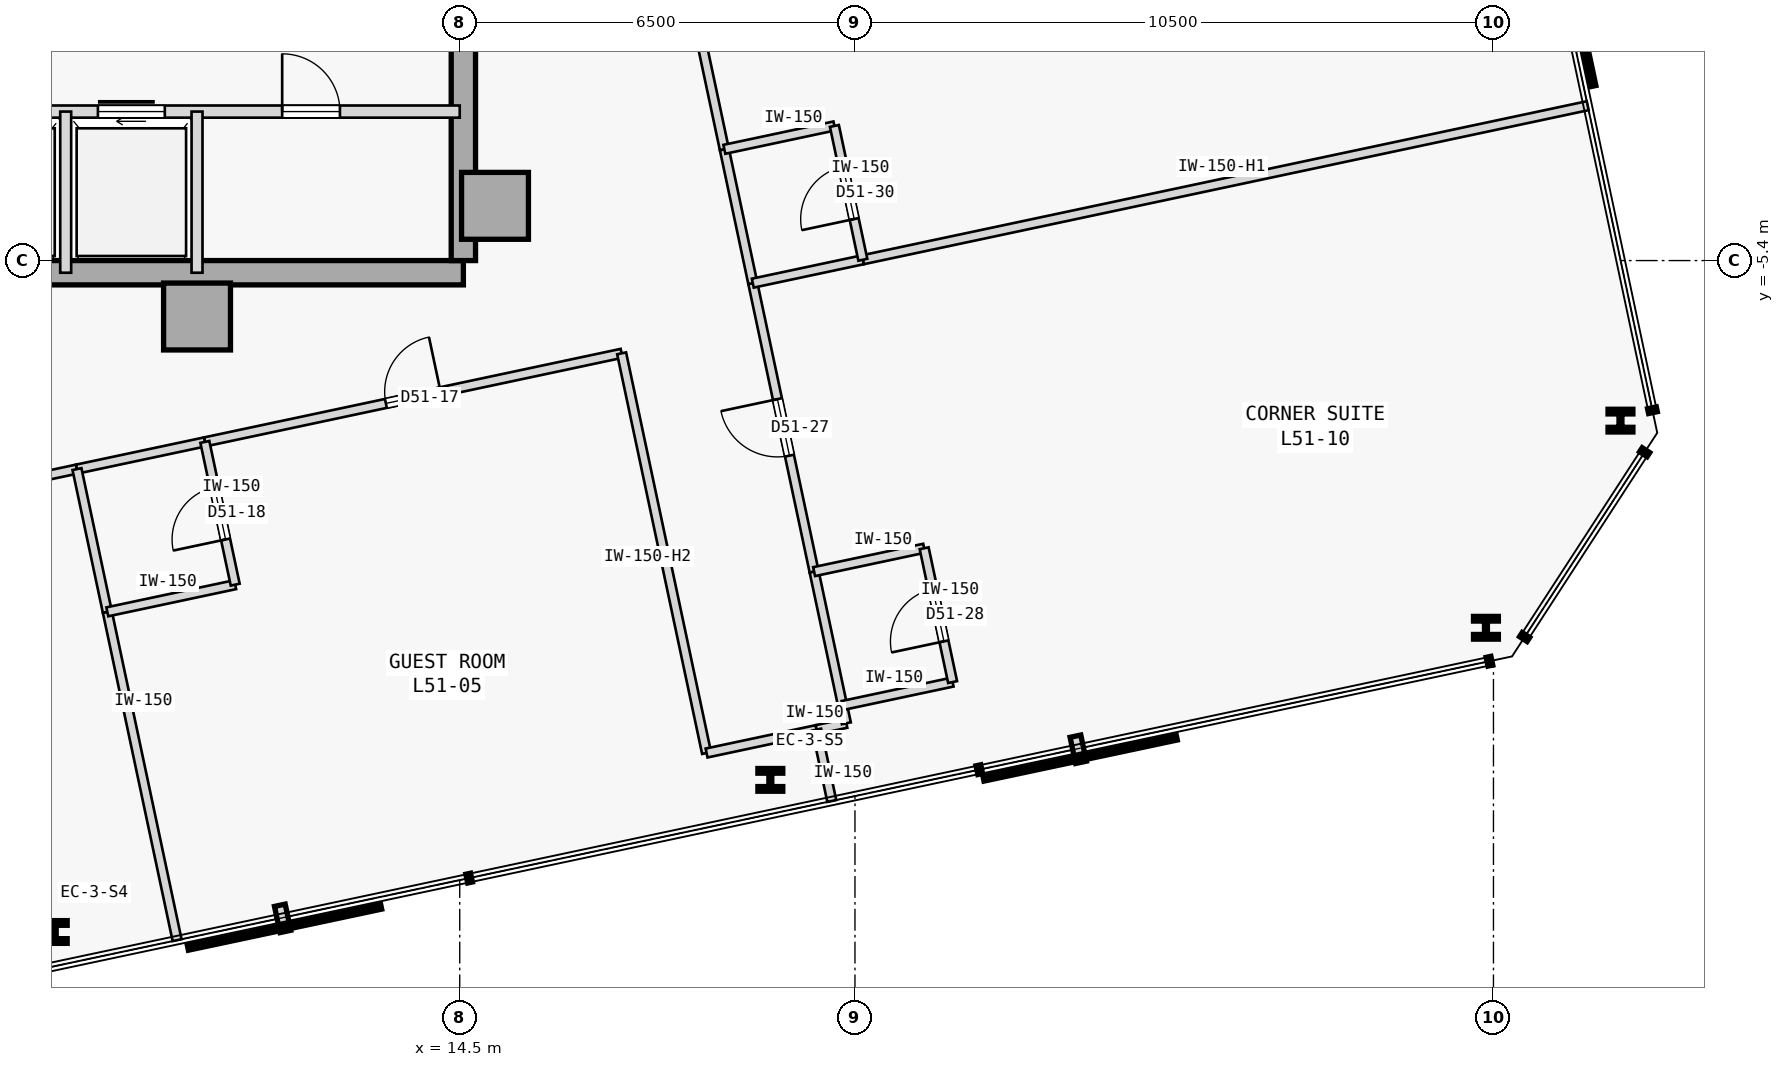
"""IFC4 building model, lengths in metres.
Left out: names, types, materials, properties, quantities, classifications, styles, units other than length and angle.
Written with IfcOpenShell. Run it as: python <this file> out.ifc"""

import sys

from ifc_helpers import new_model, si_unit, direction, frame, frame_2d, origin, origin_2d, place, context, subcontext, project, spatial, rectangle, i_section, extrude, element, fill, save


model = new_model("IFC4")
c1 = context("Model", 3, precision=1e-05, world=origin(), true_north=direction((0.0, 1.0)))
c2 = subcontext(c1, "Body", "Model", "MODEL_VIEW")
j1 = project(units=[si_unit("LENGTHUNIT", "METRE"), si_unit("PLANEANGLEUNIT", "RADIAN")], contexts=[c1])
p1 = place(None, origin())
s1 = spatial("IfcSite", under=j1, at=p1, CompositionType="ELEMENT")
p2 = place(p1, origin())
s2 = spatial("IfcBuilding", under=s1, at=p2, CompositionType="ELEMENT")
p3 = place(p2, frame((0.0, 0.0, 195.6)))
s3 = spatial("IfcBuildingStorey", under=s2, at=p3, CompositionType="ELEMENT", Elevation=195.6)
for number, where, z_axis, x_axis in (
    (1, (15.08, -4.5, 0.0), (0.0, 0.0, 1.0), (1.0, 0.0, 0.0)),
    (2, (10.18, -6.32, 0.0), (0.0, 0.0, 1.0), (1.0, 0.0, 0.0)),
):
    element("IfcColumn", number, at=place(p3, frame(where, z_axis=z_axis, x_axis=x_axis)), inside=s3, PredefinedType="COLUMN", context=c2, shape_type="SweptSolid", body=[
        extrude(rectangle(XDim=1.1, YDim=1.1, at=origin_2d()), origin(), (0.0, 0.0, 1.0), 3.4),
    ])
p4 = place(p3, frame((3.7, -5.6, 0.0), z_axis=(0.0, 0.0, 1.0), x_axis=(1.0, 0.0, 0.0)))
e3 = element("IfcWall", 3, at=p4, inside=s3, PredefinedType="SHEAR", context=c2, shape_type="SweptSolid", body=[
    extrude(rectangle(XDim=10.86, YDim=0.4, at=frame_2d((5.43, 0.0))), origin(), (0.0, 0.0, 1.0), 3.175),
])
p5 = place(p3, frame((14.56, -5.4, 0.0), z_axis=(0.0, 0.0, 1.0), x_axis=(0.0, 1.0, 0.0)))
e4 = element("IfcWall", 4, at=p5, inside=s3, PredefinedType="SHEAR", context=c2, shape_type="SweptSolid", body=[
    extrude(rectangle(XDim=10.8, YDim=0.4, at=frame_2d((5.4, 0.0))), origin(), (0.0, 0.0, 1.0), 3.175),
])
for number, where, z_axis, x_axis in (
    (5, (7.84, -16.441, 0.0), (0.0, 0.0, 1.0), (1.0, 0.0, 0.0)),
    (6, (19.608, -13.94, 0.0), (0.0, 0.0, 1.0), (1.0, 0.0, 0.0)),
    (7, (31.376, -11.439, 0.0), (0.0, 0.0, 1.0), (1.0, 0.0, 0.0)),
    (8, (33.589, -8.032, 0.0), (0.0, 0.0, 1.0), (1.0, 0.0, 0.0)),
):
    element("IfcColumn", number, at=place(p3, frame(where, z_axis=z_axis, x_axis=x_axis)), inside=s3, PredefinedType="COLUMN", context=c2, shape_type="SweptSolid", body=[
        extrude(i_section(OverallWidth=0.409, OverallDepth=0.374, WebThickness=0.048, FlangeThickness=0.077, FilletRadius=0.015, at=origin_2d()), origin(), (0.0, 0.0, 1.0), 3.4),
    ])
p6 = place(p3, frame((3.7, -2.95, 0.0), z_axis=(0.0, 0.0, 1.0), x_axis=(1.0, 0.0, 0.0)))
e9 = element("IfcWall", 9, at=p6, inside=s3, PredefinedType="STANDARD", context=c2, shape_type="SweptSolid", body=[
    extrude(rectangle(XDim=10.8, YDim=0.2, at=frame_2d((5.4, 0.0))), origin(), (0.0, 0.0, 1.0), 3.175),
])
p7 = place(p6, frame((2.69, 0.0, 0.0)))
e10 = element("IfcOpeningElement", 10, at=p7, cuts=e9, PredefinedType="OPENING", context=c2, shape_type="SweptSolid", body=[
    extrude(rectangle(XDim=1.1, YDim=2.15, at=frame_2d((0.55, 1.075))), frame((0.0, 0.11, 0.0), z_axis=(0.0, -1.0, 0.0), x_axis=(1.0, 0.0, 0.0)), (0.0, 0.0, 1.0), 0.22),
])
p8 = place(p6, frame((4.85, 0.0, 0.0)))
e11 = element("IfcOpeningElement", 11, at=p8, cuts=e9, PredefinedType="OPENING", context=c2, shape_type="SweptSolid", body=[
    extrude(rectangle(XDim=1.1, YDim=2.15, at=frame_2d((0.55, 1.075))), frame((0.0, 0.11, 0.0), z_axis=(0.0, -1.0, 0.0), x_axis=(1.0, 0.0, 0.0)), (0.0, 0.0, 1.0), 0.22),
])
p9 = place(p6, frame((7.88, 0.0, 0.0)))
e12 = element("IfcOpeningElement", 12, at=p9, cuts=e9, PredefinedType="OPENING", context=c2, shape_type="SweptSolid", body=[
    extrude(rectangle(XDim=0.95, YDim=2.15, at=frame_2d((0.475, 1.075))), frame((0.0, 0.11, 0.0), z_axis=(0.0, -1.0, 0.0), x_axis=(1.0, 0.0, 0.0)), (0.0, 0.0, 1.0), 0.22),
])
for number, where, z_axis, x_axis in (
    (13, (10.18, -5.6, 0.0), (0.0, 0.0, 1.0), (0.0, 1.0, 0.0)),
    (14, (8.02, -5.6, 0.0), (0.0, 0.0, 1.0), (0.0, 1.0, 0.0)),
):
    element("IfcWall", number, at=place(p3, frame(where, z_axis=z_axis, x_axis=x_axis)), inside=s3, PredefinedType="STANDARD", context=c2, shape_type="SweptSolid", body=[
        extrude(rectangle(XDim=2.65, YDim=0.18, at=frame_2d((1.325, 0.0))), origin(), (0.0, 0.0, 1.0), 3.175),
    ])
p10 = place(p3, frame((-1.803, -10.957, 0.0), z_axis=(0.0, 0.0, 1.0), x_axis=(0.978145386425, 0.207922108048, 0.0)))
e15 = element("IfcWall", 15, at=p10, inside=s3, PredefinedType="PARTITIONING", context=c2, shape_type="SweptSolid", body=[
    extrude(rectangle(XDim=10.232, YDim=0.15, at=frame_2d((5.116, 0.0))), origin(), (0.0, 0.0, 1.0), 3.175),
])
p11 = place(p10, frame((4.656, 0.0, 0.0)))
e16 = element("IfcOpeningElement", 16, at=p11, cuts=e15, PredefinedType="OPENING", context=c2, shape_type="SweptSolid", body=[
    extrude(rectangle(XDim=0.92, YDim=2.15, at=frame_2d((0.46, 1.075))), frame((0.0, 0.085, 0.0), z_axis=(0.0, -1.0, 0.0), x_axis=(1.0, 0.0, 0.0)), (0.0, 0.0, 1.0), 0.17),
])
p12 = place(p3, frame((10.309, -8.382, 0.0), z_axis=(0.0, 0.0, 1.0), x_axis=(0.978149817889, 0.207901259648, 0.0)))
e17 = element("IfcWall", 17, at=p12, inside=s3, PredefinedType="PARTITIONING", context=c2, shape_type="SweptSolid", body=[
    extrude(rectangle(XDim=7.007, YDim=0.15, at=frame_2d((3.503, 0.0))), origin(), (0.0, 0.0, 1.0), 3.175),
])
p13 = place(p12, frame((3.043, 0.0, 0.0)))
e18 = element("IfcOpeningElement", 18, at=p13, cuts=e17, PredefinedType="OPENING", context=c2, shape_type="SweptSolid", body=[
    extrude(rectangle(XDim=0.92, YDim=2.15, at=frame_2d((0.46, 1.075))), frame((0.0, 0.085, 0.0), z_axis=(0.0, -1.0, 0.0), x_axis=(1.0, 0.0, 0.0)), (0.0, 0.0, 1.0), 0.17),
])
p14 = place(p3, frame((18.56, -13.498, 0.0), z_axis=(0.0, 0.0, 1.0), x_axis=(-0.207888737749, 0.978152479278, 0.0)))
e19 = element("IfcWall", 19, at=p14, inside=s3, PredefinedType="PARTITIONING", context=c2, shape_type="SweptSolid", body=[
    extrude(rectangle(XDim=6.72, YDim=0.15, at=frame_2d((3.36, 0.0))), origin(), (0.0, 0.0, 1.0), 2.575),
])
p15 = place(p3, frame((18.56, -13.498, 0.0), z_axis=(0.0, 0.0, 1.0), x_axis=(0.978160192495, 0.207852442415, 0.0)))
e20 = element("IfcWall", 20, at=p15, inside=s3, PredefinedType="PARTITIONING", context=c2, shape_type="SweptSolid", body=[
    extrude(rectangle(XDim=1.85, YDim=0.15, at=frame_2d((0.925, 0.0))), origin(), (0.0, 0.0, 1.0), 3.175),
])
p16 = place(p3, frame((8.206, -8.829, 0.0), z_axis=(0.0, 0.0, 1.0), x_axis=(0.978146728319, 0.207915795165, 0.0)))
e21 = element("IfcWall", 21, at=p16, inside=s3, PredefinedType="PARTITIONING", context=c2, shape_type="SweptSolid", body=[
    extrude(rectangle(XDim=2.15, YDim=0.15, at=frame_2d((1.075, 0.0))), origin(), (0.0, 0.0, 1.0), 3.175),
])
p17 = place(p3, frame((20.369, -13.114, 0.0), z_axis=(0.0, 0.0, 1.0), x_axis=(0.978143962546, 0.207928806409, 0.0)))
e22 = element("IfcWall", 22, at=p17, inside=s3, PredefinedType="PARTITIONING", context=c2, shape_type="SweptSolid", body=[
    extrude(rectangle(XDim=0.5, YDim=0.15, at=frame_2d((0.25, 0.0))), origin(), (0.0, 0.0, 1.0), 3.175),
])
p18 = place(p3, frame((20.858, -13.01, 0.0), z_axis=(0.0, 0.0, 1.0), x_axis=(-0.208306395052, 0.978063620518, 0.0)))
e23 = element("IfcWall", 23, at=p18, inside=s3, PredefinedType="PARTITIONING", context=c2, shape_type="SweptSolid", body=[
    extrude(rectangle(XDim=0.3, YDim=0.15, at=frame_2d((0.15, 0.0))), origin(), (0.0, 0.0, 1.0), 3.175),
])
p19 = place(p3, frame((20.328, -10.515, 0.0), z_axis=(0.0, 0.0, 1.0), x_axis=(-0.207950868925, 0.97813927235, 0.0)))
e24 = element("IfcWall", 24, at=p19, inside=s3, PredefinedType="PARTITIONING", context=c2, shape_type="SweptSolid", body=[
    extrude(rectangle(XDim=4.85, YDim=0.15, at=frame_2d((2.425, 0.0))), origin(), (0.0, 0.0, 1.0), 3.175),
])
p20 = place(p19, frame((1.95, 0.0, 0.0)))
e25 = element("IfcOpeningElement", 25, at=p20, cuts=e24, PredefinedType="OPENING", context=c2, shape_type="SweptSolid", body=[
    extrude(rectangle(XDim=0.95, YDim=2.15, at=frame_2d((0.475, 1.075))), frame((0.0, 0.085, 0.0), z_axis=(0.0, -1.0, 0.0), x_axis=(1.0, 0.0, 0.0)), (0.0, 0.0, 1.0), 0.17),
])
p21 = place(p3, frame((20.796, -12.716, 0.0), z_axis=(0.0, 0.0, 1.0), x_axis=(-0.207891197838, 0.978151956427, 0.0)))
e26 = element("IfcWall", 26, at=p21, inside=s3, PredefinedType="PARTITIONING", context=c2, shape_type="SweptSolid", body=[
    extrude(rectangle(XDim=2.25, YDim=0.15, at=frame_2d((1.125, 0.0))), origin(), (0.0, 0.0, 1.0), 3.175),
])
p22 = place(p3, frame((18.852, -3.571, 0.0), z_axis=(0.0, 0.0, 1.0), x_axis=(-0.207879907349, 0.978154355979, 0.0)))
e27 = element("IfcWall", 27, at=p22, inside=s3, PredefinedType="PARTITIONING", context=c2, shape_type="SweptSolid", body=[
    extrude(rectangle(XDim=6.35, YDim=0.15, at=frame_2d((3.175, 0.0))), origin(), (0.0, 0.0, 1.0), 3.175),
])
p23 = place(p22, frame((2.7, 0.0, 0.0)))
e28 = element("IfcOpeningElement", 28, at=p23, cuts=e27, PredefinedType="OPENING", context=c2, shape_type="SweptSolid", body=[
    extrude(rectangle(XDim=0.95, YDim=2.15, at=frame_2d((0.475, 1.075))), frame((0.0, 0.085, 0.0), z_axis=(0.0, -1.0, 0.0), x_axis=(1.0, 0.0, 0.0)), (0.0, 0.0, 1.0), 0.17),
])
p24 = place(p3, frame((19.32, -5.771, 0.0), z_axis=(0.0, 0.0, 1.0), x_axis=(-0.207913264065, 0.978147266328, 0.0)))
e29 = element("IfcWall", 29, at=p24, inside=s3, PredefinedType="PARTITIONING", context=c2, shape_type="SweptSolid", body=[
    extrude(rectangle(XDim=2.25, YDim=0.15, at=frame_2d((1.125, 0.0))), origin(), (0.0, 0.0, 1.0), 3.175),
])
p25 = place(p3, frame((9.852, -16.576, 0.0), z_axis=(0.0, 0.0, 1.0), x_axis=(-0.20792487872, 0.978144797466, 0.0)))
e30 = element("IfcWall", 30, at=p25, inside=s3, PredefinedType="PARTITIONING", context=c2, shape_type="SweptSolid", body=[
    extrude(rectangle(XDim=5.52, YDim=0.15, at=frame_2d((2.76, 0.0))), origin(), (0.0, 0.0, 1.0), 3.175),
])
p26 = place(p3, frame((8.705, -11.177, 0.0), z_axis=(0.0, 0.0, 1.0), x_axis=(-0.207917150959, 0.978146440129, 0.0)))
e31 = element("IfcWall", 31, at=p26, inside=s3, PredefinedType="PARTITIONING", context=c2, shape_type="SweptSolid", body=[
    extrude(rectangle(XDim=2.4, YDim=0.15, at=frame_2d((1.2, 0.0))), origin(), (0.0, 0.0, 1.0), 3.175),
])
p27 = place(p3, frame((8.705, -11.177, 0.0), z_axis=(0.0, 0.0, 1.0), x_axis=(0.978123629285, 0.208024435669, 0.0)))
e32 = element("IfcWall", 32, at=p27, inside=s3, PredefinedType="PARTITIONING", context=c2, shape_type="SweptSolid", body=[
    extrude(rectangle(XDim=2.15, YDim=0.15, at=frame_2d((1.075, 0.0))), origin(), (0.0, 0.0, 1.0), 3.175),
])
p28 = place(p3, frame((10.808, -10.729, 0.0), z_axis=(0.0, 0.0, 1.0), x_axis=(-0.207937840262, 0.978142042133, 0.0)))
e33 = element("IfcWall", 33, at=p28, inside=s3, PredefinedType="PARTITIONING", context=c2, shape_type="SweptSolid", body=[
    extrude(rectangle(XDim=2.4, YDim=0.15, at=frame_2d((1.2, 0.0))), origin(), (0.0, 0.0, 1.0), 3.175),
])
p29 = place(p28, frame((0.76, 0.0, 0.0)))
e34 = element("IfcOpeningElement", 34, at=p29, cuts=e33, PredefinedType="OPENING", context=c2, shape_type="SweptSolid", body=[
    extrude(rectangle(XDim=0.88, YDim=2.15, at=frame_2d((0.44, 1.075))), frame((0.0, 0.085, 0.0), z_axis=(0.0, -1.0, 0.0), x_axis=(1.0, 0.0, 0.0)), (0.0, 0.0, 1.0), 0.17),
])
p30 = place(p3, frame((20.619, -14.288, 0.0), z_axis=(0.0, 0.0, 1.0), x_axis=(-0.207917150959, 0.978146440129, 0.0)))
e35 = element("IfcWall", 35, at=p30, inside=s3, PredefinedType="PARTITIONING", context=c2, shape_type="SweptSolid", body=[
    extrude(rectangle(XDim=1.2, YDim=0.15, at=frame_2d((0.6, 0.0))), origin(), (0.0, 0.0, 1.0), 3.175),
])
for number, where, z_axis, x_axis in (
    (36, (20.796, -12.716, 0.0), (0.0, 0.0, 1.0), (0.978, 0.208, 0.0)),
    (37, (20.328, -10.515, 0.0), (0.0, 0.0, 1.0), (0.978, 0.208, 0.0)),
):
    element("IfcWall", number, at=place(p3, frame(where, z_axis=z_axis, x_axis=x_axis)), inside=s3, PredefinedType="PARTITIONING", context=c2, shape_type="SweptSolid", body=[
        extrude(rectangle(XDim=1.85, YDim=0.15, at=frame_2d((0.925, 0.0))), origin(), (0.0, 0.0, 1.0), 3.175),
    ])
p31 = place(p3, frame((22.605, -12.332, 0.0), z_axis=(0.0, 0.0, 1.0), x_axis=(-0.207891197838, 0.978151956427, 0.0)))
e38 = element("IfcWall", 38, at=p31, inside=s3, PredefinedType="PARTITIONING", context=c2, shape_type="SweptSolid", body=[
    extrude(rectangle(XDim=2.25, YDim=0.15, at=frame_2d((1.125, 0.0))), origin(), (0.0, 0.0, 1.0), 3.175),
])
p32 = place(p31, frame((0.685, 0.0, 0.0)))
e39 = element("IfcOpeningElement", 39, at=p32, cuts=e38, PredefinedType="OPENING", context=c2, shape_type="SweptSolid", body=[
    extrude(rectangle(XDim=0.88, YDim=2.15, at=frame_2d((0.44, 1.075))), frame((0.0, 0.085, 0.0), z_axis=(0.0, -1.0, 0.0), x_axis=(1.0, 0.0, 0.0)), (0.0, 0.0, 1.0), 0.17),
])
p33 = place(p3, frame((21.129, -5.387, 0.0), z_axis=(0.0, 0.0, 1.0), x_axis=(0.97814556055, 0.207921288896, 0.0)))
e40 = element("IfcWall", 40, at=p33, inside=s3, PredefinedType="PARTITIONING", context=c2, shape_type="SweptSolid", body=[
    extrude(rectangle(XDim=12.187, YDim=0.15, at=frame_2d((6.094, 0.0))), origin(), (0.0, 0.0, 1.0), 2.725),
])
p34 = place(p3, frame((19.32, -5.771, 0.0), z_axis=(0.0, 0.0, 1.0), x_axis=(0.978165892835, 0.207825614625, 0.0)))
e41 = element("IfcWall", 41, at=p34, inside=s3, PredefinedType="PARTITIONING", context=c2, shape_type="SweptSolid", body=[
    extrude(rectangle(XDim=1.85, YDim=0.15, at=frame_2d((0.925, 0.0))), origin(), (0.0, 0.0, 1.0), 3.175),
])
p35 = place(p3, frame((18.852, -3.571, 0.0), z_axis=(0.0, 0.0, 1.0), x_axis=(0.978139061018, 0.207951862966, 0.0)))
e42 = element("IfcWall", 42, at=p35, inside=s3, PredefinedType="PARTITIONING", context=c2, shape_type="SweptSolid", body=[
    extrude(rectangle(XDim=1.85, YDim=0.15, at=frame_2d((0.925, 0.0))), origin(), (0.0, 0.0, 1.0), 3.175),
])
p36 = place(p3, frame((21.129, -5.387, 0.0), z_axis=(0.0, 0.0, 1.0), x_axis=(-0.207891197838, 0.978151956427, 0.0)))
e43 = element("IfcWall", 43, at=p36, inside=s3, PredefinedType="PARTITIONING", context=c2, shape_type="SweptSolid", body=[
    extrude(rectangle(XDim=2.25, YDim=0.15, at=frame_2d((1.125, 0.0))), origin(), (0.0, 0.0, 1.0), 3.175),
])
p37 = place(p36, frame((0.685, 0.0, 0.0)))
e44 = element("IfcOpeningElement", 44, at=p37, cuts=e43, PredefinedType="OPENING", context=c2, shape_type="SweptSolid", body=[
    extrude(rectangle(XDim=0.88, YDim=2.15, at=frame_2d((0.44, 1.075))), frame((0.0, 0.085, 0.0), z_axis=(0.0, -1.0, 0.0), x_axis=(1.0, 0.0, 0.0)), (0.0, 0.0, 1.0), 0.17),
])
p38 = place(p8, origin())
e45 = element("IfcDoor", 45, at=p38, inside=s3, OperationType="SLIDING_TO_RIGHT", PredefinedType="DOOR", context=c2, shape_type="SweptSolid", body=[
    extrude(rectangle(XDim=1.1, YDim=2.15, at=frame_2d((0.55, 1.075))), frame((0.0, 0.025, 0.0), z_axis=(0.0, -1.0, 0.0), x_axis=(1.0, 0.0, 0.0)), (0.0, 0.0, 1.0), 0.05),
])
fill(e11, e45)
p39 = place(p9, origin())
e46 = element("IfcDoor", 46, at=p39, inside=s3, OperationType="SINGLE_SWING_LEFT", PredefinedType="DOOR", context=c2, shape_type="SweptSolid", body=[
    extrude(rectangle(XDim=0.95, YDim=2.15, at=frame_2d((0.475, 1.075))), frame((0.0, 0.025, 0.0), z_axis=(0.0, -1.0, 0.0), x_axis=(1.0, 0.0, 0.0)), (0.0, 0.0, 1.0), 0.05),
])
fill(e12, e46)
p40 = place(p13, origin())
e47 = element("IfcDoor", 47, at=p40, inside=s3, OperationType="SINGLE_SWING_RIGHT", PredefinedType="DOOR", context=c2, shape_type="SweptSolid", body=[
    extrude(rectangle(XDim=0.92, YDim=2.15, at=frame_2d((0.46, 1.075))), frame((0.0, 0.025, 0.0), z_axis=(0.0, -1.0, 0.0), x_axis=(1.0, 0.0, 0.0)), (0.0, 0.0, 1.0), 0.05),
])
fill(e18, e47)
p41 = place(p29, origin())
e48 = element("IfcDoor", 48, at=p41, inside=s3, OperationType="SINGLE_SWING_LEFT", PredefinedType="DOOR", context=c2, shape_type="SweptSolid", body=[
    extrude(rectangle(XDim=0.88, YDim=2.15, at=frame_2d((0.44, 1.075))), frame((0.0, 0.025, 0.0), z_axis=(0.0, -1.0, 0.0), x_axis=(1.0, 0.0, 0.0)), (0.0, 0.0, 1.0), 0.05),
])
fill(e34, e48)
p42 = place(p20, origin())
e49 = element("IfcDoor", 49, at=p42, inside=s3, OperationType="SINGLE_SWING_RIGHT", PredefinedType="DOOR", context=c2, shape_type="SweptSolid", body=[
    extrude(rectangle(XDim=0.95, YDim=2.15, at=frame_2d((0.475, 1.075))), frame((0.0, 0.025, 0.0), z_axis=(0.0, -1.0, 0.0), x_axis=(1.0, 0.0, 0.0)), (0.0, 0.0, 1.0), 0.05),
])
fill(e25, e49)
p43 = place(p32, origin())
e50 = element("IfcDoor", 50, at=p43, inside=s3, OperationType="SINGLE_SWING_LEFT", PredefinedType="DOOR", context=c2, shape_type="SweptSolid", body=[
    extrude(rectangle(XDim=0.88, YDim=2.15, at=frame_2d((0.44, 1.075))), frame((0.0, 0.025, 0.0), z_axis=(0.0, -1.0, 0.0), x_axis=(1.0, 0.0, 0.0)), (0.0, 0.0, 1.0), 0.05),
])
fill(e39, e50)
p44 = place(p37, origin())
e51 = element("IfcDoor", 51, at=p44, inside=s3, OperationType="SINGLE_SWING_LEFT", PredefinedType="DOOR", context=c2, shape_type="SweptSolid", body=[
    extrude(rectangle(XDim=0.88, YDim=2.15, at=frame_2d((0.44, 1.075))), frame((0.0, 0.025, 0.0), z_axis=(0.0, -1.0, 0.0), x_axis=(1.0, 0.0, 0.0)), (0.0, 0.0, 1.0), 0.05),
])
fill(e44, e51)
save(model, sys.argv[1])
